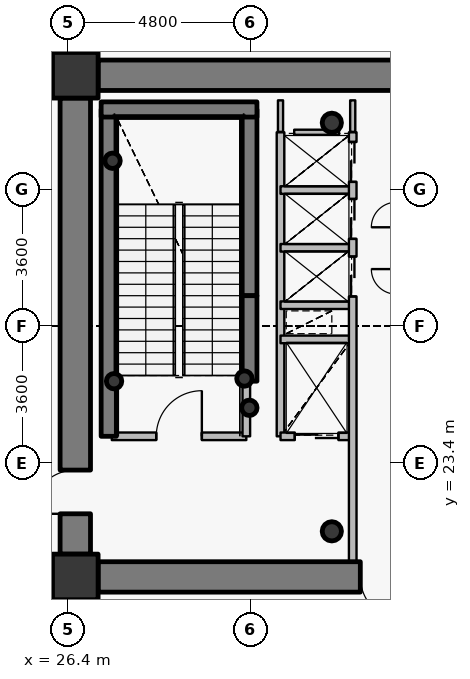
"""IFC4 building model, lengths in metres.
Left out: names, types, materials, properties, quantities, classifications, styles, units other than length and angle.
Written with IfcOpenShell. Run it as: python <this file> out.ifc"""

import sys

from ifc_helpers import new_model, si_unit, direction, frame, frame_2d, origin, origin_2d, place, context, subcontext, project, spatial, rectangle, hollow_circle, extrude, source, transform, mapped, element, fill, save


model = new_model("IFC4")
c1 = context("Model", 3, precision=1e-05, world=origin(), true_north=direction((0.0, 1.0)))
c2 = subcontext(c1, "Body", "Model", "MODEL_VIEW")
j1 = project(units=[si_unit("LENGTHUNIT", "METRE"), si_unit("PLANEANGLEUNIT", "RADIAN")], contexts=[c1])
p1 = place(None, origin())
s1 = spatial("IfcSite", under=j1, at=p1, CompositionType="ELEMENT")
p2 = place(p1, origin())
s2 = spatial("IfcBuilding", under=s1, at=p2, CompositionType="ELEMENT")
p3 = place(p2, frame((0.0, 0.0, 151.35)))
s3 = spatial("IfcBuildingStorey", under=s2, at=p3, CompositionType="ELEMENT", Elevation=151.35)
for number, where, z_axis, x_axis in (
    (1, (26.6, 20.4, 0.0), (0.0, 0.0, 1.0), (1.0, 0.0, 0.0)),
    (2, (26.6, 33.6, 0.0), (0.0, 0.0, 1.0), (1.0, 0.0, 0.0)),
):
    element("IfcColumn", number, at=place(p3, frame(where, z_axis=z_axis, x_axis=x_axis)), inside=s3, PredefinedType="COLUMN", context=c2, shape_type="SweptSolid", body=[
        extrude(rectangle(XDim=1.2, YDim=1.2, at=origin_2d()), origin(), (0.0, 0.0, 1.0), 4.8),
    ])
for number, where, z_axis, x_axis in (
    (3, (33.35, 21.6, 0.0), (0.0, 0.0, 1.0), (1.0, 0.0, 0.0)),
    (4, (33.35, 32.35, 0.0), (0.0, 0.0, 1.0), (1.0, 0.0, 0.0)),
):
    element("IfcColumn", number, at=place(p3, frame(where, z_axis=z_axis, x_axis=x_axis)), inside=s3, PredefinedType="COLUMN", context=c2, shape_type="SweptSolid", body=[
        extrude(hollow_circle(Radius=0.254, WallThickness=0.02, at=origin_2d()), origin(), (0.0, 0.0, 1.0), 4.8),
    ])
p4 = place(p3, frame((27.48, 24.1, 0.0), z_axis=(0.0, 0.0, 1.0), x_axis=(0.0, 1.0, 0.0)))
e5 = element("IfcWall", 5, at=p4, inside=s3, PredefinedType="SHEAR", context=c2, shape_type="SweptSolid", body=[
    extrude(rectangle(XDim=8.6, YDim=0.4, at=frame_2d((4.3, 0.0))), origin(), (0.0, 0.0, 1.0), 4.8),
])
p5 = place(p3, frame((31.18, 27.8, 0.0), z_axis=(0.0, 0.0, 1.0), x_axis=(0.0, 1.0, 0.0)))
e6 = element("IfcWall", 6, at=p5, inside=s3, PredefinedType="SHEAR", context=c2, shape_type="SweptSolid", body=[
    extrude(rectangle(XDim=4.9, YDim=0.4, at=frame_2d((2.45, 0.0))), origin(), (0.0, 0.0, 1.0), 4.8),
])
p6 = place(p3, frame((27.28, 32.7, 0.0), z_axis=(0.0, 0.0, 1.0), x_axis=(1.0, 0.0, 0.0)))
e7 = element("IfcWall", 7, at=p6, inside=s3, PredefinedType="SHEAR", context=c2, shape_type="SweptSolid", body=[
    extrude(rectangle(XDim=4.1, YDim=0.4, at=frame_2d((2.05, 0.0))), origin(), (0.0, 0.0, 1.0), 4.8),
])
for number, where, z_axis, x_axis in (
    (8, (27.58, 31.35, 0.0), (0.0, 0.0, 1.0), (1.0, 0.0, 0.0)),
    (9, (31.05, 25.62, 0.0), (0.0, 0.0, 1.0), (1.0, 0.0, 0.0)),
    (10, (31.18, 24.85, 0.0), (0.0, 0.0, 1.0), (1.0, 0.0, 0.0)),
    (11, (27.62, 25.55, 0.0), (0.0, 0.0, 1.0), (1.0, 0.0, 0.0)),
):
    element("IfcColumn", number, at=place(p3, frame(where, z_axis=z_axis, x_axis=x_axis)), inside=s3, PredefinedType="COLUMN", context=c2, shape_type="SweptSolid", body=[
        extrude(hollow_circle(Radius=0.203, WallThickness=0.016, at=origin_2d()), origin(), (0.0, 0.0, 1.0), 4.8),
    ])
p7 = place(p3, frame((27.2, 33.6, 0.0), z_axis=(0.0, 0.0, 1.0), x_axis=(1.0, 0.0, 0.0)))
e12 = element("IfcWall", 12, at=p7, inside=s3, PredefinedType="SHEAR", context=c2, shape_type="SweptSolid", body=[
    extrude(rectangle(XDim=17.6, YDim=0.8, at=frame_2d((8.8, 0.0))), origin(), (0.0, 0.0, 1.0), 4.0),
])
p8 = place(p7, frame((13.45, 0.0, 0.0)))
e13 = element("IfcOpeningElement", 13, at=p8, cuts=e12, PredefinedType="OPENING", context=c2, shape_type="SweptSolid", body=[
    extrude(rectangle(XDim=1.15, YDim=2.15, at=origin_2d()), frame((0.575, 0.41, 1.075), z_axis=(0.0, -1.0, 0.0), x_axis=(1.0, 0.0, 0.0)), (0.0, 0.0, 1.0), 0.82),
])
p9 = place(p3, frame((44.8, 20.4, 0.0), z_axis=(0.0, 0.0, 1.0), x_axis=(-1.0, 0.0, 0.0)))
e14 = element("IfcWall", 14, at=p9, inside=s3, PredefinedType="SHEAR", context=c2, shape_type="SweptSolid", body=[
    extrude(rectangle(XDim=17.6, YDim=0.8, at=frame_2d((8.8, 0.0))), origin(), (0.0, 0.0, 1.0), 4.0),
])
p10 = place(p9, frame((9.55, 0.0, 0.0)))
e15 = element("IfcOpeningElement", 15, at=p10, cuts=e14, PredefinedType="OPENING", context=c2, shape_type="SweptSolid", body=[
    extrude(rectangle(XDim=1.15, YDim=2.15, at=origin_2d()), frame((0.575, 0.41, 1.075), z_axis=(0.0, -1.0, 0.0), x_axis=(1.0, 0.0, 0.0)), (0.0, 0.0, 1.0), 0.82),
])
p11 = place(p3, frame((26.6, 21.0, 0.0), z_axis=(0.0, 0.0, 1.0), x_axis=(0.0, 1.0, 0.0)))
e16 = element("IfcWall", 16, at=p11, inside=s3, PredefinedType="SHEAR", context=c2, shape_type="SweptSolid", body=[
    extrude(rectangle(XDim=12.0, YDim=0.8, at=frame_2d((6.0, 0.0))), origin(), (0.0, 0.0, 1.0), 4.0),
])
p12 = place(p11, frame((1.061, 0.0, 0.0)))
e17 = element("IfcOpeningElement", 17, at=p12, cuts=e16, PredefinedType="OPENING", context=c2, shape_type="SweptSolid", body=[
    extrude(rectangle(XDim=1.15, YDim=2.15, at=origin_2d()), frame((0.575, 0.41, 1.075), z_axis=(0.0, -1.0, 0.0), x_axis=(1.0, 0.0, 0.0)), (0.0, 0.0, 1.0), 0.82),
])
p13 = place(p3, frame((31.18, 25.55, 0.0), z_axis=(0.0, 0.0, 1.0), x_axis=(0.0, 1.0, 0.0)))
e18 = element("IfcWall", 18, at=p13, inside=s3, PredefinedType="SHEAR", context=c2, shape_type="SweptSolid", body=[
    extrude(rectangle(XDim=2.25, YDim=0.4, at=frame_2d((1.125, 0.0))), origin(), (0.0, 0.0, 1.0), 4.15),
])
p14 = place(p3, frame((27.56, 24.1, 0.0), z_axis=(0.0, 0.0, 1.0), x_axis=(1.0, 0.0, 0.0)))
e19 = element("IfcWall", 19, at=p14, inside=s3, PredefinedType="PARTITIONING", context=c2, shape_type="SweptSolid", body=[
    extrude(rectangle(XDim=3.54, YDim=0.2, at=frame_2d((1.77, 0.0))), origin(), (0.0, 0.0, 1.0), 4.55),
])
p15 = place(p14, frame((1.17, 0.0, 0.0)))
e20 = element("IfcOpeningElement", 20, at=p15, cuts=e19, PredefinedType="OPENING", context=c2, shape_type="SweptSolid", body=[
    extrude(rectangle(XDim=1.2, YDim=2.15, at=origin_2d()), frame((0.6, 0.11, 1.075), z_axis=(0.0, -1.0, 0.0), x_axis=(1.0, 0.0, 0.0)), (0.0, 0.0, 1.0), 0.22),
])
p16 = place(p3, frame((31.1, 24.1, 0.0), z_axis=(0.0, 0.0, 1.0), x_axis=(0.0, 1.0, 0.0)))
e21 = element("IfcWall", 21, at=p16, inside=s3, PredefinedType="PARTITIONING", context=c2, shape_type="SweptSolid", body=[
    extrude(rectangle(XDim=1.44, YDim=0.2, at=frame_2d((0.72, 0.0))), origin(), (0.0, 0.0, 1.0), 4.55),
])
p17 = place(p3, frame((32.0, 24.1, 0.0), z_axis=(0.0, 0.0, 1.0), x_axis=(0.0, 1.0, 0.0)))
e22 = element("IfcWall", 22, at=p17, inside=s3, PredefinedType="PARTITIONING", context=c2, shape_type="SweptSolid", body=[
    extrude(rectangle(XDim=8.0, YDim=0.2, at=frame_2d((4.0, 0.0))), origin(), (0.0, 0.0, 1.0), 4.55),
])
p18 = place(p3, frame((32.0, 24.1, 0.0), z_axis=(0.0, 0.0, 1.0), x_axis=(1.0, 0.0, 0.0)))
e23 = element("IfcWall", 23, at=p18, inside=s3, PredefinedType="PARTITIONING", context=c2, shape_type="SweptSolid", body=[
    extrude(rectangle(XDim=1.9, YDim=0.2, at=frame_2d((0.95, 0.0))), origin(), (0.0, 0.0, 1.0), 4.135),
])
p19 = place(p18, frame((0.375, 0.0, 0.0)))
e24 = element("IfcOpeningElement", 24, at=p19, cuts=e23, PredefinedType="OPENING", context=c2, shape_type="SweptSolid", body=[
    extrude(rectangle(XDim=1.15, YDim=2.15, at=origin_2d()), frame((0.575, 0.11, 1.075), z_axis=(0.0, -1.0, 0.0), x_axis=(1.0, 0.0, 0.0)), (0.0, 0.0, 1.0), 0.22),
])
for number, where, z_axis, x_axis in (
    (25, (32.0, 26.65, 0.0), (0.0, 0.0, 1.0), (1.0, 0.0, 0.0)),
    (26, (32.0, 27.55, 0.0), (0.0, 0.0, 1.0), (1.0, 0.0, 0.0)),
    (27, (32.0, 29.06, 0.0), (0.0, 0.0, 1.0), (1.0, 0.0, 0.0)),
    (28, (32.0, 30.58, 0.0), (0.0, 0.0, 1.0), (1.0, 0.0, 0.0)),
):
    element("IfcWall", number, at=place(p3, frame(where, z_axis=z_axis, x_axis=x_axis)), inside=s3, PredefinedType="PARTITIONING", context=c2, shape_type="SweptSolid", body=[
        extrude(rectangle(XDim=1.9, YDim=0.2, at=frame_2d((0.95, 0.0))), origin(), (0.0, 0.0, 1.0), 4.135),
    ])
p20 = place(p3, frame((33.9, 20.8, 0.0), z_axis=(0.0, 0.0, 1.0), x_axis=(0.0, 1.0, 0.0)))
e29 = element("IfcWall", 29, at=p20, inside=s3, PredefinedType="PARTITIONING", context=c2, shape_type="SweptSolid", body=[
    extrude(rectangle(XDim=11.3, YDim=0.2, at=frame_2d((5.65, 0.0))), origin(), (0.0, 0.0, 1.0), 4.135),
])
p21 = place(p20, frame((6.98, 0.0, 0.0)))
e30 = element("IfcOpeningElement", 30, at=p21, cuts=e29, PredefinedType="OPENING", context=c2, shape_type="SweptSolid", body=[
    extrude(rectangle(XDim=1.05, YDim=2.15, at=origin_2d()), frame((0.525, 0.11, 1.075), z_axis=(0.0, -1.0, 0.0), x_axis=(1.0, 0.0, 0.0)), (0.0, 0.0, 1.0), 0.22),
])
p22 = place(p20, frame((8.495, 0.0, 0.0)))
e31 = element("IfcOpeningElement", 31, at=p22, cuts=e29, PredefinedType="OPENING", context=c2, shape_type="SweptSolid", body=[
    extrude(rectangle(XDim=1.05, YDim=2.15, at=origin_2d()), frame((0.525, 0.11, 1.075), z_axis=(0.0, -1.0, 0.0), x_axis=(1.0, 0.0, 0.0)), (0.0, 0.0, 1.0), 0.22),
])
p23 = place(p20, frame((9.995, 0.0, 0.0)))
e32 = element("IfcOpeningElement", 32, at=p23, cuts=e29, PredefinedType="OPENING", context=c2, shape_type="SweptSolid", body=[
    extrude(rectangle(XDim=1.05, YDim=2.15, at=origin_2d()), frame((0.525, 0.11, 1.075), z_axis=(0.0, -1.0, 0.0), x_axis=(1.0, 0.0, 0.0)), (0.0, 0.0, 1.0), 0.22),
])
p24 = place(p3, frame((32.36, 32.1, 0.0), z_axis=(0.0, 0.0, 1.0), x_axis=(1.0, 0.0, 0.0)))
e33 = element("IfcWall", 33, at=p24, inside=s3, PredefinedType="PARTITIONING", context=c2, shape_type="SweptSolid", body=[
    extrude(rectangle(XDim=1.18, YDim=0.135, at=frame_2d((0.59, 0.0))), origin(), (0.0, 0.0, 1.0), 4.135),
])
p25 = place(p3, frame((32.0, 32.94, 0.0), z_axis=(0.0, 0.0, 1.0), x_axis=(0.0, -1.0, 0.0)))
e34 = element("IfcWall", 34, at=p25, inside=s3, PredefinedType="PARTITIONING", context=c2, shape_type="SweptSolid", body=[
    extrude(rectangle(XDim=0.83, YDim=0.135, at=frame_2d((0.415, 0.0))), origin(), (0.0, 0.0, 1.0), 4.085),
])
p26 = place(p3, frame((33.9, 32.11, 0.0), z_axis=(0.0, 0.0, 1.0), x_axis=(0.0, 1.0, 0.0)))
e35 = element("IfcWall", 35, at=p26, inside=s3, PredefinedType="PARTITIONING", context=c2, shape_type="SweptSolid", body=[
    extrude(rectangle(XDim=0.83, YDim=0.135, at=frame_2d((0.415, 0.0))), origin(), (0.0, 0.0, 1.0), 4.135),
])
p27 = place(p3, frame((27.19, 34.0, 0.0), z_axis=(0.0, 0.0, 1.0), x_axis=(-1.0, 0.0, 0.0)))
e36 = element("IfcWall", 36, at=p27, inside=s3, PredefinedType="PARTITIONING", context=c2, shape_type="SweptSolid", body=[
    extrude(rectangle(XDim=0.99, YDim=0.135, at=frame_2d((0.495, 0.0))), origin(), (0.0, 0.0, 1.0), 3.985),
])
p28 = place(p3, frame((26.2, 33.692, 0.0), z_axis=(0.0, 0.0, 1.0), x_axis=(0.0, -1.0, 0.0)))
e37 = element("IfcWall", 37, at=p28, inside=s3, PredefinedType="PARTITIONING", context=c2, shape_type="SweptSolid", body=[
    extrude(rectangle(XDim=0.682, YDim=0.135, at=frame_2d((0.341, 0.0))), origin(), (0.0, 0.0, 1.0), 4.55),
])
p29 = place(p3, frame((26.2, 20.99, 0.0), z_axis=(0.0, 0.0, 1.0), x_axis=(0.0, -1.0, 0.0)))
e38 = element("IfcWall", 38, at=p29, inside=s3, PredefinedType="PARTITIONING", context=c2, shape_type="SweptSolid", body=[
    extrude(rectangle(XDim=0.99, YDim=0.135, at=frame_2d((0.495, 0.0))), origin(), (0.0, 0.0, 1.0), 4.55),
])
p30 = place(p3, frame((26.508, 20.0, 0.0), z_axis=(0.0, 0.0, 1.0), x_axis=(1.0, 0.0, 0.0)))
e39 = element("IfcWall", 39, at=p30, inside=s3, PredefinedType="PARTITIONING", context=c2, shape_type="SweptSolid", body=[
    extrude(rectangle(XDim=0.682, YDim=0.135, at=frame_2d((0.341, 0.0))), origin(), (0.0, 0.0, 1.0), 3.985),
])
m1 = source(origin(), c2, "Body", "SweptSolid", [
    extrude(rectangle(XDim=1.15, YDim=2.15, at=origin_2d()), frame((0.575, 0.025, 1.075), z_axis=(0.0, -1.0, 0.0), x_axis=(1.0, 0.0, 0.0)), (0.0, 0.0, 1.0), 0.05),
])
p31 = place(p12, origin())
e40 = element("IfcDoor", 40, at=p31, inside=s3, OperationType="SINGLE_SWING_LEFT", PredefinedType="DOOR", context=c2, shape_type="MappedRepresentation", body=[
    mapped(m1, transform((0.0, 0.0, 0.0), x_axis=(1.0, 0.0, 0.0), y_axis=(0.0, 1.0, 0.0), z_axis=(0.0, 0.0, 1.0), scale=1.0)),
])
fill(e17, e40)
p32 = place(p10, origin())
e41 = element("IfcDoor", 41, at=p32, inside=s3, OperationType="SINGLE_SWING_LEFT", PredefinedType="DOOR", context=c2, shape_type="MappedRepresentation", body=[
    mapped(m1, transform((0.0, 0.0, 0.0), x_axis=(1.0, 0.0, 0.0), y_axis=(0.0, 1.0, 0.0), z_axis=(0.0, 0.0, 1.0), scale=1.0)),
])
fill(e15, e41)
m2 = source(origin(), c2, "Body", "SweptSolid", [
    extrude(rectangle(XDim=1.2, YDim=2.15, at=origin_2d()), frame((0.6, 0.025, 1.075), z_axis=(0.0, -1.0, 0.0), x_axis=(1.0, 0.0, 0.0)), (0.0, 0.0, 1.0), 0.05),
])
p33 = place(p15, origin())
e42 = element("IfcDoor", 42, at=p33, inside=s3, OperationType="SINGLE_SWING_RIGHT", PredefinedType="DOOR", context=c2, shape_type="MappedRepresentation", body=[
    mapped(m2, transform((0.0, 0.0, 0.0), x_axis=(1.0, 0.0, 0.0), y_axis=(0.0, 1.0, 0.0), z_axis=(0.0, 0.0, 1.0), scale=1.0)),
])
fill(e20, e42)
m3 = source(origin(), c2, "Body", "SweptSolid", [
    extrude(rectangle(XDim=1.15, YDim=2.15, at=origin_2d()), frame((0.575, 0.025, 1.075), z_axis=(0.0, -1.0, 0.0), x_axis=(1.0, 0.0, 0.0)), (0.0, 0.0, 1.0), 0.05),
])
p34 = place(p19, origin())
e43 = element("IfcDoor", 43, at=p34, inside=s3, OperationType="DOUBLE_DOOR_SLIDING", PredefinedType="USERDEFINED", context=c2, shape_type="MappedRepresentation", body=[
    mapped(m3, transform((0.0, 0.0, 0.0), x_axis=(1.0, 0.0, 0.0), y_axis=(0.0, 1.0, 0.0), z_axis=(0.0, 0.0, 1.0), scale=1.0)),
])
fill(e24, e43)
m4 = source(origin(), c2, "Body", "SweptSolid", [
    extrude(rectangle(XDim=1.05, YDim=2.15, at=origin_2d()), frame((0.525, 0.025, 1.075), z_axis=(0.0, -1.0, 0.0), x_axis=(1.0, 0.0, 0.0)), (0.0, 0.0, 1.0), 0.05),
])
p35 = place(p21, origin())
e44 = element("IfcDoor", 44, at=p35, inside=s3, OperationType="DOUBLE_DOOR_SLIDING", PredefinedType="USERDEFINED", context=c2, shape_type="MappedRepresentation", body=[
    mapped(m4, transform((0.0, 0.0, 0.0), x_axis=(1.0, 0.0, 0.0), y_axis=(0.0, 1.0, 0.0), z_axis=(0.0, 0.0, 1.0), scale=1.0)),
])
fill(e30, e44)
p36 = place(p22, origin())
e45 = element("IfcDoor", 45, at=p36, inside=s3, OperationType="DOUBLE_DOOR_SLIDING", PredefinedType="USERDEFINED", context=c2, shape_type="MappedRepresentation", body=[
    mapped(m4, transform((0.0, 0.0, 0.0), x_axis=(1.0, 0.0, 0.0), y_axis=(0.0, 1.0, 0.0), z_axis=(0.0, 0.0, 1.0), scale=1.0)),
])
fill(e31, e45)
p37 = place(p23, origin())
e46 = element("IfcDoor", 46, at=p37, inside=s3, OperationType="DOUBLE_DOOR_SLIDING", PredefinedType="USERDEFINED", context=c2, shape_type="MappedRepresentation", body=[
    mapped(m4, transform((0.0, 0.0, 0.0), x_axis=(1.0, 0.0, 0.0), y_axis=(0.0, 1.0, 0.0), z_axis=(0.0, 0.0, 1.0), scale=1.0)),
])
fill(e32, e46)
save(model, sys.argv[1])
